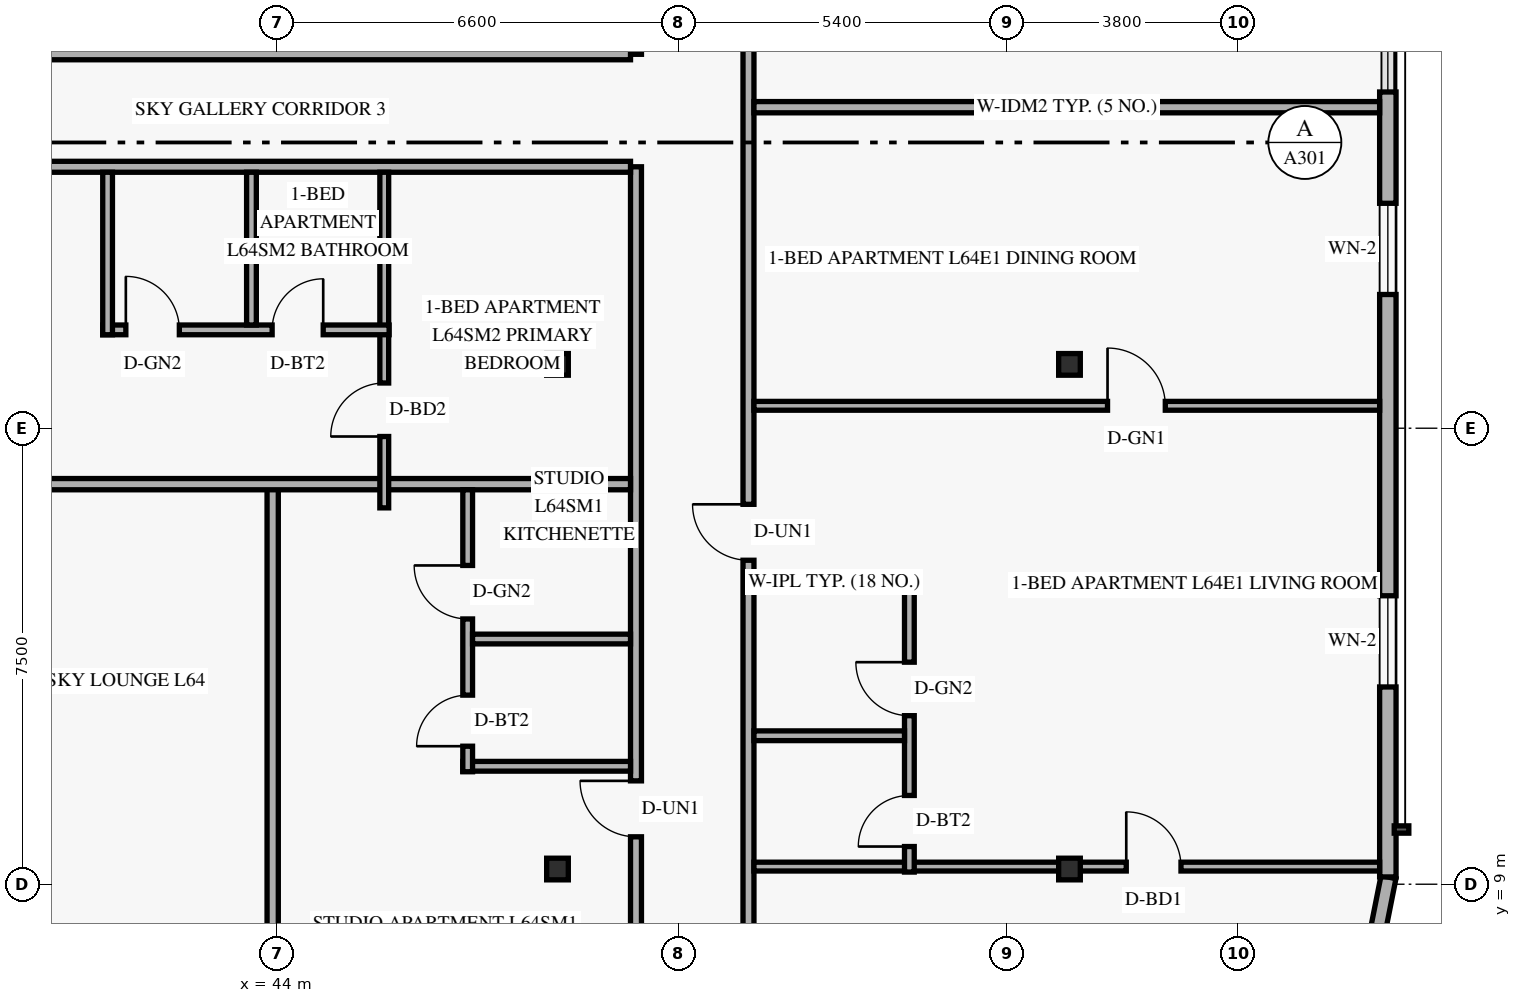
"""IFC4 building model, lengths in metres.
Left out: names, types, materials, properties, quantities, classifications, styles, units other than length and angle.
Written with IfcOpenShell. Run it as: python <this file> out.ifc"""

import sys

from ifc_helpers import new_model, si_unit, direction, frame, frame_2d, origin, origin_2d, place, context, subcontext, project, spatial, rectangle, hollow_rectangle, extrude, element, fill, save


model = new_model("IFC4")
c1 = context("Model", 3, precision=1e-05, world=origin(), true_north=direction((0.0, 1.0)))
c2 = subcontext(c1, "Body", "Model", "MODEL_VIEW")
j1 = project(units=[si_unit("LENGTHUNIT", "METRE"), si_unit("PLANEANGLEUNIT", "RADIAN")], contexts=[c1])
p1 = place(None, origin())
s1 = spatial("IfcSite", under=j1, at=p1, CompositionType="ELEMENT")
p2 = place(p1, origin())
s2 = spatial("IfcBuilding", under=s1, at=p2, CompositionType="ELEMENT")
p3 = place(p2, frame((0.0, 0.0, 246.0)))
s3 = spatial("IfcBuildingStorey", under=s2, at=p3, CompositionType="ELEMENT", Elevation=246.0)
for number, where, z_axis, x_axis in (
    (1, (48.546, 9.25, 0.0), (0.035, 0.0, 0.999), (0.0, 1.0, 0.0)),
    (2, (48.546, 17.55, 0.0), (0.035, 0.0, 0.999), (0.0, 1.0, 0.0)),
):
    element("IfcColumn", number, at=place(p3, frame(where, z_axis=z_axis, x_axis=x_axis)), inside=s3, PredefinedType="COLUMN", context=c2, shape_type="SweptSolid", body=[
        extrude(hollow_rectangle(XDim=0.356, YDim=0.356, WallThickness=0.016, at=origin_2d()), origin(), (0.0, 0.0, 1.0), 3.602),
    ])
for number, where, z_axis, x_axis in (
    (3, (56.925, 9.25, 0.0), (0.058, 0.0, 0.998), (0.0, 1.0, 0.0)),
    (4, (56.925, 17.55, 0.0), (0.058, 0.0, 0.998), (0.0, 1.0, 0.0)),
):
    element("IfcColumn", number, at=place(p3, frame(where, z_axis=z_axis, x_axis=x_axis)), inside=s3, PredefinedType="COLUMN", context=c2, shape_type="SweptSolid", body=[
        extrude(hollow_rectangle(XDim=0.356, YDim=0.356, WallThickness=0.016, at=origin_2d()), origin(), (0.0, 0.0, 1.0), 3.606),
    ])
p4 = place(p3, frame((62.005, 7.754, 0.0), z_axis=(0.0, 0.0, 1.0), x_axis=(0.195135625965, 0.9807762678, 0.0)))
e5 = element("IfcWall", 5, at=p4, inside=s3, PredefinedType="SOLIDWALL", context=c2, shape_type="SweptSolid", body=[
    extrude(rectangle(XDim=1.389, YDim=0.25, at=frame_2d((0.694, 0.0))), origin(), (0.0, 0.0, 1.0), 3.36),
])
p5 = place(p3, frame((62.265, 9.12, 0.0), z_axis=(0.0, 0.0, 1.0), x_axis=(0.0, 1.0, 0.0)))
e6 = element("IfcWall", 6, at=p5, inside=s3, PredefinedType="SOLIDWALL", context=c2, shape_type="SweptSolid", body=[
    extrude(rectangle(XDim=12.91, YDim=0.27, at=frame_2d((6.455, 0.0))), origin(), (0.0, 0.0, 1.0), 3.36),
])
p6 = place(p5, frame((3.125, 0.0, 0.85)))
e7 = element("IfcOpeningElement", 7, at=p6, cuts=e6, PredefinedType="OPENING", context=c2, shape_type="SweptSolid", body=[
    extrude(rectangle(XDim=1.5, YDim=1.55, at=frame_2d((0.75, 0.775))), frame((0.0, 0.145, 0.0), z_axis=(0.0, -1.0, 0.0), x_axis=(1.0, 0.0, 0.0)), (0.0, 0.0, 1.0), 0.29),
])
p7 = place(p5, frame((9.579, 0.0, 0.85)))
e8 = element("IfcOpeningElement", 8, at=p7, cuts=e6, PredefinedType="OPENING", context=c2, shape_type="SweptSolid", body=[
    extrude(rectangle(XDim=1.5, YDim=1.55, at=frame_2d((0.75, 0.775))), frame((0.0, 0.145, 0.0), z_axis=(0.0, -1.0, 0.0), x_axis=(1.0, 0.0, 0.0)), (0.0, 0.0, 1.0), 0.29),
])
p8 = place(p3, frame((49.9, 5.77, 0.0), z_axis=(0.0, 0.0, 1.0), x_axis=(0.0, 1.0, 0.0)))
e9 = element("IfcWall", 9, at=p8, inside=s3, PredefinedType="STANDARD", context=c2, shape_type="SweptSolid", body=[
    extrude(rectangle(XDim=15.03, YDim=0.18, at=frame_2d((7.515, 0.0))), origin(), (0.0, 0.0, 1.0), 2.803),
])
p9 = place(p8, frame((4.01, 0.0, 0.0)))
e10 = element("IfcOpeningElement", 10, at=p9, cuts=e9, PredefinedType="OPENING", context=c2, shape_type="SweptSolid", body=[
    extrude(rectangle(XDim=0.92, YDim=2.15, at=frame_2d((0.46, 1.075))), frame((0.0, 0.1, 0.0), z_axis=(0.0, -1.0, 0.0), x_axis=(1.0, 0.0, 0.0)), (0.0, 0.0, 1.0), 0.2),
])
p10 = place(p3, frame((49.9, 22.65, 0.0), z_axis=(0.0, 0.0, 1.0), x_axis=(0.0, 1.0, 0.0)))
e11 = element("IfcWall", 11, at=p10, inside=s3, PredefinedType="STANDARD", context=c2, shape_type="SweptSolid", body=[
    extrude(rectangle(XDim=19.58, YDim=0.18, at=frame_2d((9.79, 0.0))), origin(), (0.0, 0.0, 1.0), 2.803),
])
p11 = place(p10, frame((13.7, 0.0, 0.0)))
e12 = element("IfcOpeningElement", 12, at=p11, cuts=e11, PredefinedType="OPENING", context=c2, shape_type="SweptSolid", body=[
    extrude(rectangle(XDim=0.92, YDim=2.15, at=frame_2d((0.46, 1.075))), frame((0.0, 0.1, 0.0), z_axis=(0.0, -1.0, 0.0), x_axis=(1.0, 0.0, 0.0)), (0.0, 0.0, 1.0), 0.2),
])
p12 = place(p3, frame((37.64, 20.8, 0.0), z_axis=(0.0, 0.0, 1.0), x_axis=(1.0, 0.0, 0.0)))
e13 = element("IfcWall", 13, at=p12, inside=s3, PredefinedType="STANDARD", context=c2, shape_type="SweptSolid", body=[
    extrude(rectangle(XDim=12.17, YDim=0.18, at=frame_2d((6.085, 0.0))), origin(), (0.0, 0.0, 1.0), 2.803),
])
p13 = place(p12, frame((0.32, 0.0, 0.0)))
e14 = element("IfcOpeningElement", 14, at=p13, cuts=e13, PredefinedType="OPENING", context=c2, shape_type="SweptSolid", body=[
    extrude(rectangle(XDim=0.92, YDim=2.15, at=frame_2d((0.46, 1.075))), frame((0.0, 0.1, 0.0), z_axis=(0.0, -1.0, 0.0), x_axis=(1.0, 0.0, 0.0)), (0.0, 0.0, 1.0), 0.2),
])
p14 = place(p3, frame((37.64, 22.65, 0.0), z_axis=(0.0, 0.0, 1.0), x_axis=(1.0, 0.0, 0.0)))
e15 = element("IfcWall", 15, at=p14, inside=s3, PredefinedType="STANDARD", context=c2, shape_type="SweptSolid", body=[
    extrude(rectangle(XDim=12.17, YDim=0.18, at=frame_2d((6.085, 0.0))), origin(), (0.0, 0.0, 1.0), 2.803),
])
p15 = place(p14, frame((0.32, 0.0, 0.0)))
e16 = element("IfcOpeningElement", 16, at=p15, cuts=e15, PredefinedType="OPENING", context=c2, shape_type="SweptSolid", body=[
    extrude(rectangle(XDim=0.92, YDim=2.15, at=frame_2d((0.46, 1.075))), frame((0.0, 0.1, 0.0), z_axis=(0.0, -1.0, 0.0), x_axis=(1.0, 0.0, 0.0)), (0.0, 0.0, 1.0), 0.2),
])
p16 = place(p3, frame((51.75, 5.77, 0.0), z_axis=(0.0, 0.0, 1.0), x_axis=(0.0, 1.0, 0.0)))
e17 = element("IfcWall", 17, at=p16, inside=s3, PredefinedType="STANDARD", context=c2, shape_type="SweptSolid", body=[
    extrude(rectangle(XDim=36.46, YDim=0.18, at=frame_2d((18.23, 0.0))), origin(), (0.0, 0.0, 1.0), 2.803),
])
p17 = place(p16, frame((8.559, 0.0, 0.0)))
e18 = element("IfcOpeningElement", 18, at=p17, cuts=e17, PredefinedType="OPENING", context=c2, shape_type="SweptSolid", body=[
    extrude(rectangle(XDim=0.92, YDim=2.15, at=frame_2d((0.46, 1.075))), frame((0.0, 0.1, 0.0), z_axis=(0.0, -1.0, 0.0), x_axis=(1.0, 0.0, 0.0)), (0.0, 0.0, 1.0), 0.2),
])
p18 = place(p16, frame((26.933, 0.0, 0.0)))
e19 = element("IfcOpeningElement", 19, at=p18, cuts=e17, PredefinedType="OPENING", context=c2, shape_type="SweptSolid", body=[
    extrude(rectangle(XDim=0.92, YDim=2.15, at=frame_2d((0.46, 1.075))), frame((0.0, 0.1, 0.0), z_axis=(0.0, -1.0, 0.0), x_axis=(1.0, 0.0, 0.0)), (0.0, 0.0, 1.0), 0.2),
])
p19 = place(p3, frame((51.84, 9.29, 0.0), z_axis=(0.0, 0.0, 1.0), x_axis=(1.0, 0.0, 0.0)))
e20 = element("IfcWall", 20, at=p19, inside=s3, PredefinedType="PARTITIONING", context=c2, shape_type="SweptSolid", body=[
    extrude(rectangle(XDim=10.29, YDim=0.145, at=frame_2d((5.145, 0.0))), origin(), (0.0, 0.0, 1.0), 2.803),
])
p20 = place(p19, frame((6.123, 0.0, 0.0)))
e21 = element("IfcOpeningElement", 21, at=p20, cuts=e20, PredefinedType="OPENING", context=c2, shape_type="SweptSolid", body=[
    extrude(rectangle(XDim=0.9, YDim=2.14, at=frame_2d((0.45, 1.07))), frame((0.0, 0.083, 0.0), z_axis=(0.0, -1.0, 0.0), x_axis=(1.0, 0.0, 0.0)), (0.0, 0.0, 1.0), 0.165),
])
p21 = place(p3, frame((51.84, 13.969, 0.0), z_axis=(0.0, 0.0, 1.0), x_axis=(1.0, 0.0, 0.0)))
e22 = element("IfcWall", 22, at=p21, inside=s3, PredefinedType="PLUMBINGWALL", context=c2, shape_type="SweptSolid", body=[
    extrude(rectangle(XDim=2.636, YDim=0.16, at=frame_2d((1.318, 0.0))), origin(), (0.0, 0.0, 1.0), 3.36),
])
p22 = place(p3, frame((54.396, 9.2, 0.0), z_axis=(0.0, 0.0, 1.0), x_axis=(0.0, 1.0, 0.0)))
e23 = element("IfcWall", 23, at=p22, inside=s3, PredefinedType="PLUMBINGWALL", context=c2, shape_type="SweptSolid", body=[
    extrude(rectangle(XDim=4.859, YDim=0.16, at=frame_2d((2.429, 0.0))), origin(), (0.0, 0.0, 1.0), 2.803),
])
p23 = place(p22, frame((0.42, 0.0, 0.0)))
e24 = element("IfcOpeningElement", 24, at=p23, cuts=e23, PredefinedType="OPENING", context=c2, shape_type="SweptSolid", body=[
    extrude(rectangle(XDim=0.84, YDim=2.12, at=frame_2d((0.42, 1.06))), frame((0.0, 0.09, 0.0), z_axis=(0.0, -1.0, 0.0), x_axis=(1.0, 0.0, 0.0)), (0.0, 0.0, 1.0), 0.18),
])
p24 = place(p22, frame((2.572, 0.0, 0.0)))
e25 = element("IfcOpeningElement", 25, at=p24, cuts=e23, PredefinedType="OPENING", context=c2, shape_type="SweptSolid", body=[
    extrude(rectangle(XDim=0.88, YDim=2.12, at=frame_2d((0.44, 1.06))), frame((0.0, 0.09, 0.0), z_axis=(0.0, -1.0, 0.0), x_axis=(1.0, 0.0, 0.0)), (0.0, 0.0, 1.0), 0.18),
])
p25 = place(p3, frame((51.84, 11.442, 0.0), z_axis=(0.0, 0.0, 1.0), x_axis=(1.0, 0.0, 0.0)))
e26 = element("IfcWall", 26, at=p25, inside=s3, PredefinedType="PLUMBINGWALL", context=c2, shape_type="SweptSolid", body=[
    extrude(rectangle(XDim=2.476, YDim=0.16, at=frame_2d((1.238, 0.0))), origin(), (0.0, 0.0, 1.0), 3.36),
])
p26 = place(p3, frame((51.84, 16.869, 0.0), z_axis=(0.0, 0.0, 1.0), x_axis=(1.0, 0.0, 0.0)))
e27 = element("IfcWall", 27, at=p26, inside=s3, PredefinedType="PARTITIONING", context=c2, shape_type="SweptSolid", body=[
    extrude(rectangle(XDim=10.29, YDim=0.145, at=frame_2d((5.145, 0.0))), origin(), (0.0, 0.0, 1.0), 2.879),
])
p27 = place(p26, frame((5.815, 0.0, 0.0)))
e28 = element("IfcOpeningElement", 28, at=p27, cuts=e27, PredefinedType="OPENING", context=c2, shape_type="SweptSolid", body=[
    extrude(rectangle(XDim=0.95, YDim=2.15, at=frame_2d((0.475, 1.075))), frame((0.0, 0.083, 0.0), z_axis=(0.0, -1.0, 0.0), x_axis=(1.0, 0.0, 0.0)), (0.0, 0.0, 1.0), 0.165),
])
p28 = place(p3, frame((51.84, 21.78, 0.0), z_axis=(0.0, 0.0, 1.0), x_axis=(1.0, 0.0, 0.0)))
e29 = element("IfcWall", 29, at=p28, inside=s3, PredefinedType="PARTITIONING", context=c2, shape_type="SweptSolid", body=[
    extrude(rectangle(XDim=10.29, YDim=0.185, at=frame_2d((5.145, 0.0))), origin(), (0.0, 0.0, 1.0), 2.879),
])
p29 = place(p3, frame((43.925, 5.77, 0.0), z_axis=(0.0, 0.0, 1.0), x_axis=(0.0, 1.0, 0.0)))
e30 = element("IfcWall", 30, at=p29, inside=s3, PredefinedType="PARTITIONING", context=c2, shape_type="SweptSolid", body=[
    extrude(rectangle(XDim=9.81, YDim=0.185, at=frame_2d((4.905, 0.0))), origin(), (0.0, 0.0, 1.0), 2.803),
])
p30 = place(p3, frame((38.022, 15.58, 0.0), z_axis=(0.0, 0.0, 1.0), x_axis=(1.0, 0.0, 0.0)))
e31 = element("IfcWall", 31, at=p30, inside=s3, PredefinedType="PARTITIONING", context=c2, shape_type="SweptSolid", body=[
    extrude(rectangle(XDim=11.788, YDim=0.185, at=frame_2d((5.894, 0.0))), origin(), (0.0, 0.0, 1.0), 2.803),
])
p31 = place(p3, frame((47.052, 10.94, 0.0), z_axis=(0.0, 0.0, 1.0), x_axis=(1.0, 0.0, 0.0)))
e32 = element("IfcWall", 32, at=p31, inside=s3, PredefinedType="PLUMBINGWALL", context=c2, shape_type="SweptSolid", body=[
    extrude(rectangle(XDim=2.758, YDim=0.16, at=frame_2d((1.379, 0.0))), origin(), (0.0, 0.0, 1.0), 2.803),
])
p32 = place(p3, frame((47.132, 10.85, 0.0), z_axis=(0.0, 0.0, 1.0), x_axis=(0.0, 1.0, 0.0)))
e33 = element("IfcWall", 33, at=p32, inside=s3, PredefinedType="PLUMBINGWALL", context=c2, shape_type="SweptSolid", body=[
    extrude(rectangle(XDim=4.637, YDim=0.16, at=frame_2d((2.319, 0.0))), origin(), (0.0, 0.0, 1.0), 3.039),
])
p33 = place(p32, frame((0.42, 0.0, 0.0)))
e34 = element("IfcOpeningElement", 34, at=p33, cuts=e33, PredefinedType="OPENING", context=c2, shape_type="SweptSolid", body=[
    extrude(rectangle(XDim=0.84, YDim=2.12, at=frame_2d((0.42, 1.06))), frame((0.0, 0.09, 0.0), z_axis=(0.0, -1.0, 0.0), x_axis=(1.0, 0.0, 0.0)), (0.0, 0.0, 1.0), 0.18),
])
p34 = place(p32, frame((2.513, 0.0, 0.0)))
e35 = element("IfcOpeningElement", 35, at=p34, cuts=e33, PredefinedType="OPENING", context=c2, shape_type="SweptSolid", body=[
    extrude(rectangle(XDim=0.88, YDim=2.12, at=frame_2d((0.44, 1.06))), frame((0.0, 0.09, 0.0), z_axis=(0.0, -1.0, 0.0), x_axis=(1.0, 0.0, 0.0)), (0.0, 0.0, 1.0), 0.18),
])
p35 = place(p3, frame((47.212, 13.033, 0.0), z_axis=(0.0, 0.0, 1.0), x_axis=(1.0, 0.0, 0.0)))
e36 = element("IfcWall", 36, at=p35, inside=s3, PredefinedType="PLUMBINGWALL", context=c2, shape_type="SweptSolid", body=[
    extrude(rectangle(XDim=2.598, YDim=0.16, at=frame_2d((1.299, 0.0))), origin(), (0.0, 0.0, 1.0), 2.803),
])
p36 = place(p3, frame((45.76, 15.19, 0.0), z_axis=(0.0, 0.0, 1.0), x_axis=(0.0, 1.0, 0.0)))
e37 = element("IfcWall", 37, at=p36, inside=s3, PredefinedType="PARTITIONING", context=c2, shape_type="SweptSolid", body=[
    extrude(rectangle(XDim=5.52, YDim=0.145, at=frame_2d((2.76, 0.0))), origin(), (0.0, 0.0, 1.0), 2.803),
])
p37 = place(p36, frame((1.174, 0.0, 0.0)))
e38 = element("IfcOpeningElement", 38, at=p37, cuts=e37, PredefinedType="OPENING", context=c2, shape_type="SweptSolid", body=[
    extrude(rectangle(XDim=0.88, YDim=2.14, at=frame_2d((0.44, 1.07))), frame((0.0, 0.083, 0.0), z_axis=(0.0, -1.0, 0.0), x_axis=(1.0, 0.0, 0.0)), (0.0, 0.0, 1.0), 0.165),
])
p38 = place(p3, frame((41.13, 18.117, 0.0), z_axis=(0.0, 0.0, 1.0), x_axis=(1.0, 0.0, 0.0)))
e39 = element("IfcWall", 39, at=p38, inside=s3, PredefinedType="PLUMBINGWALL", context=c2, shape_type="SweptSolid", body=[
    extrude(rectangle(XDim=4.71, YDim=0.16, at=frame_2d((2.355, 0.0))), origin(), (0.0, 0.0, 1.0), 3.36),
])
p39 = place(p38, frame((0.38, 0.0, 0.0)))
e40 = element("IfcOpeningElement", 40, at=p39, cuts=e39, PredefinedType="OPENING", context=c2, shape_type="SweptSolid", body=[
    extrude(rectangle(XDim=0.88, YDim=2.12, at=frame_2d((0.44, 1.06))), frame((0.0, 0.09, 0.0), z_axis=(0.0, -1.0, 0.0), x_axis=(1.0, 0.0, 0.0)), (0.0, 0.0, 1.0), 0.18),
])
p40 = place(p38, frame((2.786, 0.0, 0.0)))
e41 = element("IfcOpeningElement", 41, at=p40, cuts=e39, PredefinedType="OPENING", context=c2, shape_type="SweptSolid", body=[
    extrude(rectangle(XDim=0.84, YDim=2.12, at=frame_2d((0.42, 1.06))), frame((0.0, 0.09, 0.0), z_axis=(0.0, -1.0, 0.0), x_axis=(1.0, 0.0, 0.0)), (0.0, 0.0, 1.0), 0.18),
])
p41 = place(p3, frame((41.21, 18.038, 0.0), z_axis=(0.0, 0.0, 1.0), x_axis=(0.0, 1.0, 0.0)))
e42 = element("IfcWall", 42, at=p41, inside=s3, PredefinedType="PLUMBINGWALL", context=c2, shape_type="SweptSolid", body=[
    extrude(rectangle(XDim=2.672, YDim=0.16, at=frame_2d((1.336, 0.0))), origin(), (0.0, 0.0, 1.0), 3.36),
])
p42 = place(p3, frame((43.576, 18.198, 0.0), z_axis=(0.0, 0.0, 1.0), x_axis=(0.0, 1.0, 0.0)))
e43 = element("IfcWall", 43, at=p42, inside=s3, PredefinedType="PLUMBINGWALL", context=c2, shape_type="SweptSolid", body=[
    extrude(rectangle(XDim=2.512, YDim=0.16, at=frame_2d((1.256, 0.0))), origin(), (0.0, 0.0, 1.0), 3.36),
])
p43 = place(p6, origin())
e44 = element("IfcWindow", 44, at=p43, inside=s3, PartitioningType="SINGLE_PANEL", PredefinedType="WINDOW", context=c2, shape_type="SweptSolid", body=[
    extrude(rectangle(XDim=1.5, YDim=1.55, at=frame_2d((0.75, 0.775))), frame((0.0, 0.03, 0.0), z_axis=(0.0, -1.0, 0.0), x_axis=(1.0, 0.0, 0.0)), (0.0, 0.0, 1.0), 0.06),
])
fill(e7, e44)
p44 = place(p7, origin())
e45 = element("IfcWindow", 45, at=p44, inside=s3, PartitioningType="SINGLE_PANEL", PredefinedType="WINDOW", context=c2, shape_type="SweptSolid", body=[
    extrude(rectangle(XDim=1.5, YDim=1.55, at=frame_2d((0.75, 0.775))), frame((0.0, 0.03, 0.0), z_axis=(0.0, -1.0, 0.0), x_axis=(1.0, 0.0, 0.0)), (0.0, 0.0, 1.0), 0.06),
])
fill(e8, e45)
p45 = place(p27, origin())
e46 = element("IfcDoor", 46, at=p45, inside=s3, OperationType="SINGLE_SWING_LEFT", PredefinedType="DOOR", context=c2, shape_type="SweptSolid", body=[
    extrude(rectangle(XDim=0.95, YDim=2.15, at=frame_2d((0.475, 1.075))), frame((0.0, 0.025, 0.0), z_axis=(0.0, -1.0, 0.0), x_axis=(1.0, 0.0, 0.0)), (0.0, 0.0, 1.0), 0.05),
])
fill(e28, e46)
p46 = place(p17, origin())
e47 = element("IfcDoor", 47, at=p46, inside=s3, OperationType="SINGLE_SWING_RIGHT", PredefinedType="DOOR", context=c2, shape_type="SweptSolid", body=[
    extrude(rectangle(XDim=0.92, YDim=2.15, at=frame_2d((0.46, 1.075))), frame((0.0, 0.025, 0.0), z_axis=(0.0, -1.0, 0.0), x_axis=(1.0, 0.0, 0.0)), (0.0, 0.0, 1.0), 0.05),
])
fill(e18, e47)
p47 = place(p23, origin())
e48 = element("IfcDoor", 48, at=p47, inside=s3, OperationType="SINGLE_SWING_LEFT", PredefinedType="DOOR", context=c2, shape_type="SweptSolid", body=[
    extrude(rectangle(XDim=0.84, YDim=2.12, at=frame_2d((0.42, 1.06))), frame((0.0, 0.025, 0.0), z_axis=(0.0, -1.0, 0.0), x_axis=(1.0, 0.0, 0.0)), (0.0, 0.0, 1.0), 0.05),
])
fill(e24, e48)
p48 = place(p24, origin())
e49 = element("IfcDoor", 49, at=p48, inside=s3, OperationType="SINGLE_SWING_RIGHT", PredefinedType="DOOR", context=c2, shape_type="SweptSolid", body=[
    extrude(rectangle(XDim=0.88, YDim=2.12, at=frame_2d((0.44, 1.06))), frame((0.0, 0.025, 0.0), z_axis=(0.0, -1.0, 0.0), x_axis=(1.0, 0.0, 0.0)), (0.0, 0.0, 1.0), 0.05),
])
fill(e25, e49)
p49 = place(p20, origin())
e50 = element("IfcDoor", 50, at=p49, inside=s3, OperationType="SINGLE_SWING_LEFT", PredefinedType="DOOR", context=c2, shape_type="SweptSolid", body=[
    extrude(rectangle(XDim=0.9, YDim=2.14, at=frame_2d((0.45, 1.07))), frame((0.0, 0.025, 0.0), z_axis=(0.0, -1.0, 0.0), x_axis=(1.0, 0.0, 0.0)), (0.0, 0.0, 1.0), 0.05),
])
fill(e21, e50)
p50 = place(p9, origin())
e51 = element("IfcDoor", 51, at=p50, inside=s3, OperationType="SINGLE_SWING_RIGHT", PredefinedType="DOOR", context=c2, shape_type="SweptSolid", body=[
    extrude(rectangle(XDim=0.92, YDim=2.15, at=frame_2d((0.46, 1.075))), frame((0.0, 0.025, 0.0), z_axis=(0.0, -1.0, 0.0), x_axis=(1.0, 0.0, 0.0)), (0.0, 0.0, 1.0), 0.05),
])
fill(e10, e51)
p51 = place(p33, origin())
e52 = element("IfcDoor", 52, at=p51, inside=s3, OperationType="SINGLE_SWING_LEFT", PredefinedType="DOOR", context=c2, shape_type="SweptSolid", body=[
    extrude(rectangle(XDim=0.84, YDim=2.12, at=frame_2d((0.42, 1.06))), frame((0.0, 0.025, 0.0), z_axis=(0.0, -1.0, 0.0), x_axis=(1.0, 0.0, 0.0)), (0.0, 0.0, 1.0), 0.05),
])
fill(e34, e52)
p52 = place(p34, origin())
e53 = element("IfcDoor", 53, at=p52, inside=s3, OperationType="SINGLE_SWING_RIGHT", PredefinedType="DOOR", context=c2, shape_type="SweptSolid", body=[
    extrude(rectangle(XDim=0.88, YDim=2.12, at=frame_2d((0.44, 1.06))), frame((0.0, 0.025, 0.0), z_axis=(0.0, -1.0, 0.0), x_axis=(1.0, 0.0, 0.0)), (0.0, 0.0, 1.0), 0.05),
])
fill(e35, e53)
p53 = place(p39, origin())
e54 = element("IfcDoor", 54, at=p53, inside=s3, OperationType="SINGLE_SWING_LEFT", PredefinedType="DOOR", context=c2, shape_type="SweptSolid", body=[
    extrude(rectangle(XDim=0.88, YDim=2.12, at=frame_2d((0.44, 1.06))), frame((0.0, 0.025, 0.0), z_axis=(0.0, -1.0, 0.0), x_axis=(1.0, 0.0, 0.0)), (0.0, 0.0, 1.0), 0.05),
])
fill(e40, e54)
p54 = place(p40, origin())
e55 = element("IfcDoor", 55, at=p54, inside=s3, OperationType="SINGLE_SWING_RIGHT", PredefinedType="DOOR", context=c2, shape_type="SweptSolid", body=[
    extrude(rectangle(XDim=0.84, YDim=2.12, at=frame_2d((0.42, 1.06))), frame((0.0, 0.025, 0.0), z_axis=(0.0, -1.0, 0.0), x_axis=(1.0, 0.0, 0.0)), (0.0, 0.0, 1.0), 0.05),
])
fill(e41, e55)
p55 = place(p37, origin())
e56 = element("IfcDoor", 56, at=p55, inside=s3, OperationType="SINGLE_SWING_LEFT", PredefinedType="DOOR", context=c2, shape_type="SweptSolid", body=[
    extrude(rectangle(XDim=0.88, YDim=2.14, at=frame_2d((0.44, 1.07))), frame((0.0, 0.025, 0.0), z_axis=(0.0, -1.0, 0.0), x_axis=(1.0, 0.0, 0.0)), (0.0, 0.0, 1.0), 0.05),
])
fill(e38, e56)
save(model, sys.argv[1])
